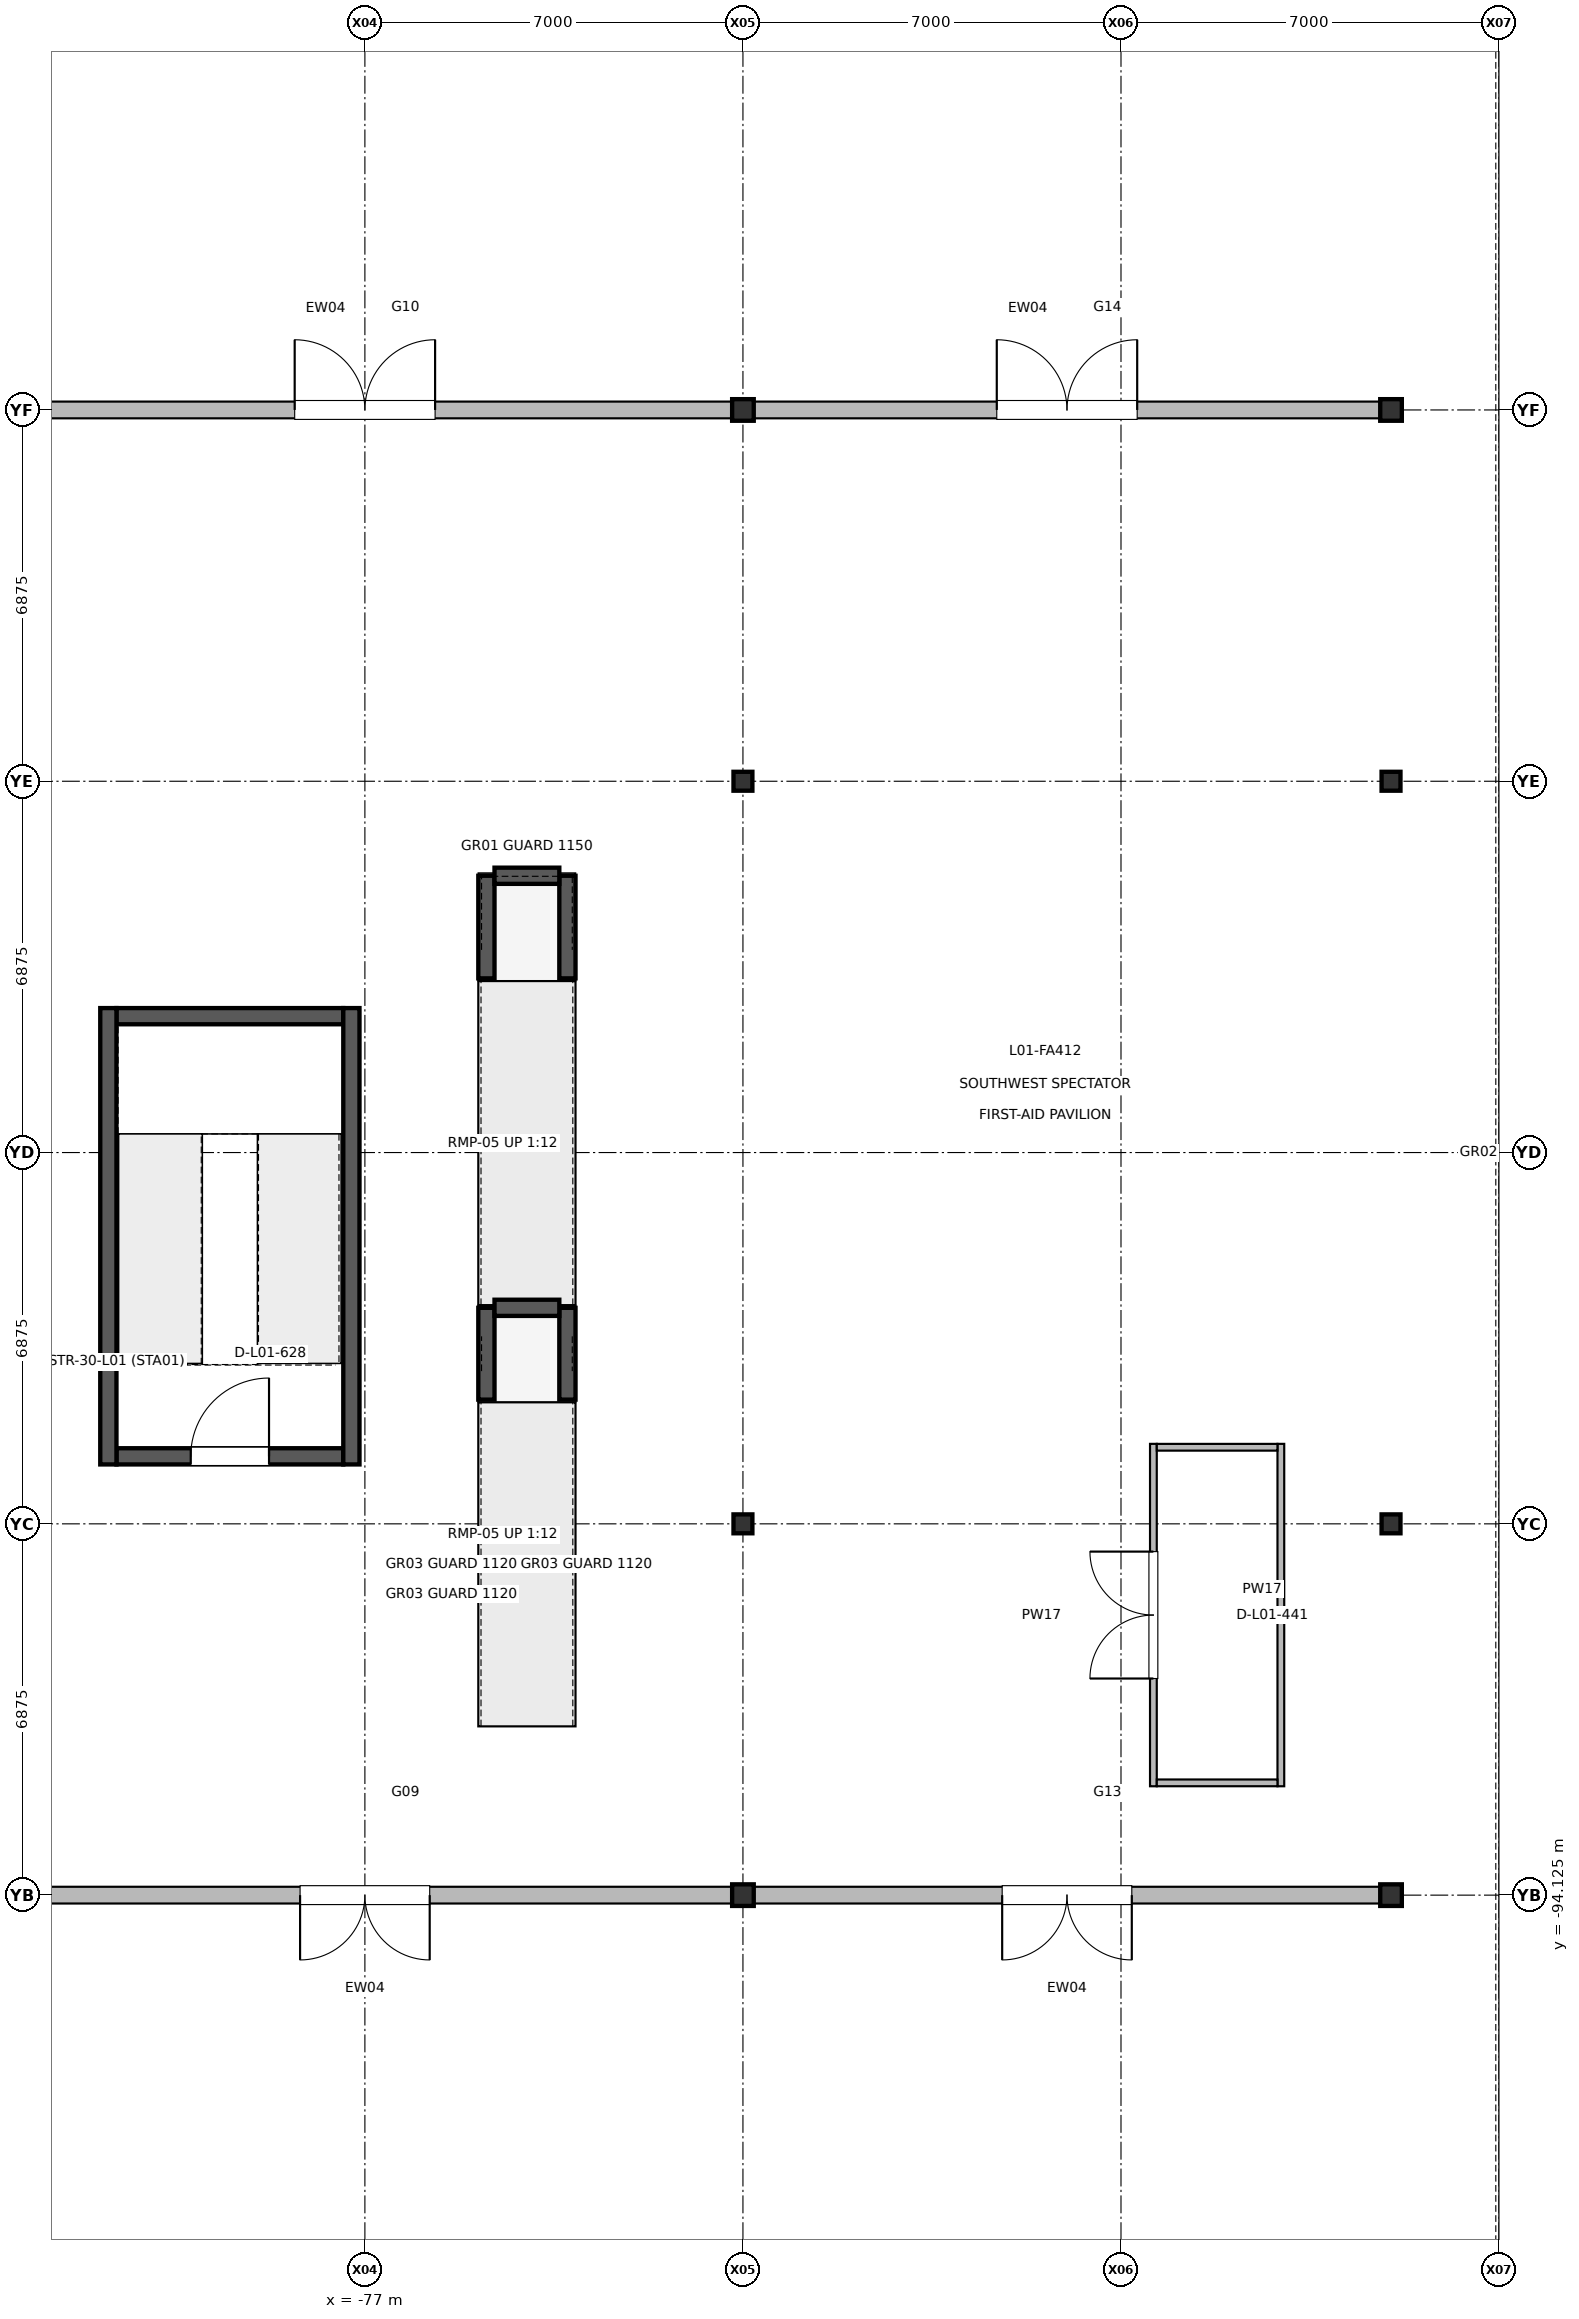
"""IFC4 building model, lengths in metres.
Left out: names, types, materials, properties, quantities, classifications, styles, units other than length and angle.
Written with IfcOpenShell. Run it as: python <this file> out.ifc"""

import sys

from ifc_helpers import new_model, si_unit, direction, frame, frame_2d, origin, origin_2d, place, context, subcontext, project, spatial, rectangle, i_section, extrude, element, fill, save


model = new_model("IFC4")
c1 = context("Model", 3, precision=1e-05, world=origin(), true_north=direction((0.0, 1.0)))
c2 = subcontext(c1, "Body", "Model", "MODEL_VIEW")
j1 = project(units=[si_unit("LENGTHUNIT", "METRE"), si_unit("PLANEANGLEUNIT", "RADIAN")], contexts=[c1])
p1 = place(None, origin())
s1 = spatial("IfcSite", under=j1, at=p1, CompositionType="ELEMENT")
p2 = place(p1, origin())
s2 = spatial("IfcBuilding", under=s1, at=p2, CompositionType="ELEMENT")
p3 = place(p2, origin())
s3 = spatial("IfcBuildingStorey", under=s2, at=p3, CompositionType="ELEMENT", Elevation=0.0)
p4 = place(p3, frame((-70.0, -94.125, 0.0), z_axis=(0.0, 0.0, 1.0), x_axis=(1.0, 0.0, 0.0)))
e1 = element("IfcColumn", 1, at=p4, inside=s3, PredefinedType="COLUMN", context=c2, shape_type="SweptSolid", body=[
    extrude(i_section(OverallWidth=0.4, OverallDepth=0.4, WebThickness=0.013, FlangeThickness=0.021, at=origin_2d()), origin(), (0.0, 0.0, 1.0), 5.998),
])
for number, where, z_axis, x_axis in (
    (2, (-70.0, -87.25, 0.0), (0.0, 0.0, 1.0), (1.0, 0.0, 0.0)),
    (3, (-70.0, -73.5, 0.0), (0.0, 0.0, 1.0), (1.0, 0.0, 0.0)),
):
    element("IfcColumn", number, at=place(p3, frame(where, z_axis=z_axis, x_axis=x_axis)), inside=s3, PredefinedType="COLUMN", context=c2, shape_type="SweptSolid", body=[
        extrude(i_section(OverallWidth=0.35, OverallDepth=0.35, WebThickness=0.012, FlangeThickness=0.019, at=origin_2d()), origin(), (0.0, 0.0, 1.0), 5.998),
    ])
for number, where, z_axis, x_axis in (
    (4, (-70.0, -66.625, 0.0), (0.0, 0.0, 1.0), (1.0, 0.0, 0.0)),
    (5, (-58.0, -94.125, 0.0), (0.0, 0.0, 1.0), (1.0, 0.0, 0.0)),
):
    element("IfcColumn", number, at=place(p3, frame(where, z_axis=z_axis, x_axis=x_axis)), inside=s3, PredefinedType="COLUMN", context=c2, shape_type="SweptSolid", body=[
        extrude(i_section(OverallWidth=0.4, OverallDepth=0.4, WebThickness=0.013, FlangeThickness=0.021, at=origin_2d()), origin(), (0.0, 0.0, 1.0), 5.998),
    ])
for number, where, z_axis, x_axis in (
    (6, (-58.0, -87.25, 0.0), (0.0, 0.0, 1.0), (1.0, 0.0, 0.0)),
    (7, (-58.0, -73.5, 0.0), (0.0, 0.0, 1.0), (1.0, 0.0, 0.0)),
):
    element("IfcColumn", number, at=place(p3, frame(where, z_axis=z_axis, x_axis=x_axis)), inside=s3, PredefinedType="COLUMN", context=c2, shape_type="SweptSolid", body=[
        extrude(i_section(OverallWidth=0.35, OverallDepth=0.35, WebThickness=0.012, FlangeThickness=0.019, at=origin_2d()), origin(), (0.0, 0.0, 1.0), 5.998),
    ])
p5 = place(p3, frame((-58.0, -66.625, 0.0), z_axis=(0.0, 0.0, 1.0), x_axis=(1.0, 0.0, 0.0)))
e8 = element("IfcColumn", 8, at=p5, inside=s3, PredefinedType="COLUMN", context=c2, shape_type="SweptSolid", body=[
    extrude(i_section(OverallWidth=0.4, OverallDepth=0.4, WebThickness=0.013, FlangeThickness=0.021, at=origin_2d()), origin(), (0.0, 0.0, 1.0), 5.998),
])
p6 = place(p3, frame((-70.19, -94.125, 0.0), z_axis=(0.0, 0.0, 1.0), x_axis=(-1.0, 0.0, 0.0)))
e9 = element("IfcWall", 9, at=p6, inside=s3, PredefinedType="SOLIDWALL", context=c2, shape_type="SweptSolid", body=[
    extrude(rectangle(XDim=13.62, YDim=0.31, at=frame_2d((6.81, 0.0))), origin(), (0.0, 0.0, 1.0), 3.975),
])
p7 = place(p6, frame((5.61, 0.0, 0.0)))
e10 = element("IfcOpeningElement", 10, at=p7, cuts=e9, PredefinedType="OPENING", context=c2, shape_type="SweptSolid", body=[
    extrude(rectangle(XDim=2.4, YDim=2.5, at=frame_2d((1.2, 1.25))), frame((0.0, 0.165, 0.0), z_axis=(0.0, -1.0, 0.0), x_axis=(1.0, 0.0, 0.0)), (0.0, 0.0, 1.0), 0.33),
])
p8 = place(p3, frame((-83.81, -66.625, 0.0), z_axis=(0.0, 0.0, 1.0), x_axis=(1.0, 0.0, 0.0)))
e11 = element("IfcWall", 11, at=p8, inside=s3, PredefinedType="SOLIDWALL", context=c2, shape_type="SweptSolid", body=[
    extrude(rectangle(XDim=13.62, YDim=0.31, at=frame_2d((6.81, 0.0))), origin(), (0.0, 0.0, 1.0), 4.175),
])
p9 = place(p8, frame((5.51, 0.0, 0.0)))
e12 = element("IfcOpeningElement", 12, at=p9, cuts=e11, PredefinedType="OPENING", context=c2, shape_type="SweptSolid", body=[
    extrude(rectangle(XDim=2.6, YDim=2.55, at=frame_2d((1.3, 1.275))), frame((0.0, 0.165, 0.0), z_axis=(0.0, -1.0, 0.0), x_axis=(1.0, 0.0, 0.0)), (0.0, 0.0, 1.0), 0.33),
])
p10 = place(p3, frame((-58.19, -94.125, 0.0), z_axis=(0.0, 0.0, 1.0), x_axis=(-1.0, 0.0, 0.0)))
e13 = element("IfcWall", 13, at=p10, inside=s3, PredefinedType="SOLIDWALL", context=c2, shape_type="SweptSolid", body=[
    extrude(rectangle(XDim=11.62, YDim=0.31, at=frame_2d((5.81, 0.0))), origin(), (0.0, 0.0, 1.0), 3.975),
])
p11 = place(p10, frame((4.61, 0.0, 0.0)))
e14 = element("IfcOpeningElement", 14, at=p11, cuts=e13, PredefinedType="OPENING", context=c2, shape_type="SweptSolid", body=[
    extrude(rectangle(XDim=2.4, YDim=2.5, at=frame_2d((1.2, 1.25))), frame((0.0, 0.165, 0.0), z_axis=(0.0, -1.0, 0.0), x_axis=(1.0, 0.0, 0.0)), (0.0, 0.0, 1.0), 0.33),
])
p12 = place(p3, frame((-69.81, -66.625, 0.0), z_axis=(0.0, 0.0, 1.0), x_axis=(1.0, 0.0, 0.0)))
e15 = element("IfcWall", 15, at=p12, inside=s3, PredefinedType="SOLIDWALL", context=c2, shape_type="SweptSolid", body=[
    extrude(rectangle(XDim=11.62, YDim=0.31, at=frame_2d((5.81, 0.0))), origin(), (0.0, 0.0, 1.0), 4.175),
])
p13 = place(p12, frame((4.51, 0.0, 0.0)))
e16 = element("IfcOpeningElement", 16, at=p13, cuts=e15, PredefinedType="OPENING", context=c2, shape_type="SweptSolid", body=[
    extrude(rectangle(XDim=2.6, YDim=2.55, at=frame_2d((1.3, 1.275))), frame((0.0, 0.165, 0.0), z_axis=(0.0, -1.0, 0.0), x_axis=(1.0, 0.0, 0.0)), (0.0, 0.0, 1.0), 0.33),
])
p14 = place(p3, frame((-62.4, -92.109, 0.0), z_axis=(0.0, 0.0, 1.0), x_axis=(0.0, 1.0, 0.0)))
e17 = element("IfcWall", 17, at=p14, inside=s3, PredefinedType="PARTITIONING", context=c2, shape_type="SweptSolid", body=[
    extrude(rectangle(XDim=6.34, YDim=0.125, at=frame_2d((3.17, 0.0))), origin(), (0.0, 0.0, 1.0), 4.775),
])
p15 = place(p14, frame((1.995, 0.0, 0.0)))
e18 = element("IfcOpeningElement", 18, at=p15, cuts=e17, PredefinedType="OPENING", context=c2, shape_type="SweptSolid", body=[
    extrude(rectangle(XDim=2.35, YDim=2.5, at=frame_2d((1.175, 1.25))), frame((0.0, 0.073, 0.0), z_axis=(0.0, -1.0, 0.0), x_axis=(1.0, 0.0, 0.0)), (0.0, 0.0, 1.0), 0.145),
])
p16 = place(p3, frame((-60.04, -92.109, 0.0), z_axis=(0.0, 0.0, 1.0), x_axis=(0.0, 1.0, 0.0)))
e19 = element("IfcWall", 19, at=p16, inside=s3, PredefinedType="PARTITIONING", context=c2, shape_type="SweptSolid", body=[
    extrude(rectangle(XDim=6.34, YDim=0.125, at=frame_2d((3.17, 0.0))), origin(), (0.0, 0.0, 1.0), 4.775),
])
for number, where, z_axis, x_axis in (
    (20, (-62.337, -92.046, 0.0), (0.0, 0.0, 1.0), (1.0, 0.0, 0.0)),
    (21, (-62.337, -85.832, 0.0), (0.0, 0.0, 1.0), (1.0, 0.0, 0.0)),
):
    element("IfcWall", number, at=place(p3, frame(where, z_axis=z_axis, x_axis=x_axis)), inside=s3, PredefinedType="PARTITIONING", context=c2, shape_type="SweptSolid", body=[
        extrude(rectangle(XDim=2.234, YDim=0.125, at=frame_2d((1.117, 0.0))), origin(), (0.0, 0.0, 1.0), 5.02),
    ])
p17 = place(p3, frame((-81.6, -86.0, 0.0), z_axis=(0.0, 0.0, 1.0), x_axis=(1.0, 0.0, 0.0)))
e22 = element("IfcWall", 22, at=p17, inside=s3, PredefinedType="SHEAR", context=c2, shape_type="SweptSolid", body=[
    extrude(rectangle(XDim=4.2, YDim=0.3, at=frame_2d((2.1, 0.0))), origin(), (0.0, 0.0, 1.0), 5.8),
])
p18 = place(p17, frame((1.375, 0.0, 0.0)))
e23 = element("IfcOpeningElement", 23, at=p18, cuts=e22, PredefinedType="OPENING", context=c2, shape_type="SweptSolid", body=[
    extrude(rectangle(XDim=1.45, YDim=2.2, at=frame_2d((0.725, 1.1))), frame((0.0, 0.16, 0.0), z_axis=(0.0, -1.0, 0.0), x_axis=(1.0, 0.0, 0.0)), (0.0, 0.0, 1.0), 0.32),
])
p19 = place(p3, frame((-81.6, -77.85, 0.0), z_axis=(0.0, 0.0, 1.0), x_axis=(1.0, 0.0, 0.0)))
e24 = element("IfcWall", 24, at=p19, inside=s3, PredefinedType="SHEAR", context=c2, shape_type="SweptSolid", body=[
    extrude(rectangle(XDim=4.2, YDim=0.3, at=frame_2d((2.1, 0.0))), origin(), (0.0, 0.0, 1.0), 5.8),
])
for number, where, z_axis, x_axis in (
    (25, (-81.75, -86.15, 0.0), (0.0, 0.0, 1.0), (0.0, 1.0, 0.0)),
    (26, (-77.25, -86.15, 0.0), (0.0, 0.0, 1.0), (0.0, 1.0, 0.0)),
):
    element("IfcWall", number, at=place(p3, frame(where, z_axis=z_axis, x_axis=x_axis)), inside=s3, PredefinedType="SHEAR", context=c2, shape_type="SweptSolid", body=[
        extrude(rectangle(XDim=8.45, YDim=0.3, at=frame_2d((4.225, 0.0))), origin(), (0.0, 0.0, 1.0), 5.8),
    ])
for number, where, z_axis, x_axis in (
    (27, (-74.75, -84.95, 0.0), (0.0, 0.0, 1.0), (0.0, 1.0, 0.0)),
    (28, (-73.25, -84.95, 0.0), (0.0, 0.0, 1.0), (0.0, 1.0, 0.0)),
):
    element("IfcWall", number, at=place(p3, frame(where, z_axis=z_axis, x_axis=x_axis)), inside=s3, PredefinedType="SHEAR", context=c2, shape_type="SweptSolid", body=[
        extrude(rectangle(XDim=1.7, YDim=0.3, at=frame_2d((0.85, 0.0))), origin(), (0.0, 0.0, 1.0), 0.3),
    ])
p20 = place(p3, frame((-74.6, -83.25, 0.0), z_axis=(0.0, 0.0, 1.0), x_axis=(1.0, 0.0, 0.0)))
e29 = element("IfcWall", 29, at=p20, inside=s3, PredefinedType="SHEAR", context=c2, shape_type="SweptSolid", body=[
    extrude(rectangle(XDim=1.2, YDim=0.3, at=frame_2d((0.6, 0.0))), origin(), (0.0, 0.0, 1.0), 0.3),
])
for number, where, z_axis, x_axis in (
    (30, (-74.75, -77.15, 0.0), (0.0, 0.0, 1.0), (0.0, 1.0, 0.0)),
    (31, (-73.25, -77.15, 0.0), (0.0, 0.0, 1.0), (0.0, 1.0, 0.0)),
):
    element("IfcWall", number, at=place(p3, frame(where, z_axis=z_axis, x_axis=x_axis)), inside=s3, PredefinedType="SHEAR", context=c2, shape_type="SweptSolid", body=[
        extrude(rectangle(XDim=1.9, YDim=0.3, at=frame_2d((0.95, 0.0))), origin(), (0.0, 0.0, 1.0), 0.8),
    ])
p21 = place(p3, frame((-74.6, -75.25, 0.0), z_axis=(0.0, 0.0, 1.0), x_axis=(1.0, 0.0, 0.0)))
e32 = element("IfcWall", 32, at=p21, inside=s3, PredefinedType="SHEAR", context=c2, shape_type="SweptSolid", body=[
    extrude(rectangle(XDim=1.2, YDim=0.3, at=frame_2d((0.6, 0.0))), origin(), (0.0, 0.0, 1.0), 0.8),
])
p22 = place(p7, origin())
e33 = element("IfcDoor", 33, at=p22, inside=s3, OperationType="DOUBLE_DOOR_SINGLE_SWING", PredefinedType="DOOR", context=c2, shape_type="SweptSolid", body=[
    extrude(rectangle(XDim=2.4, YDim=2.5, at=frame_2d((1.2, 1.25))), frame((0.0, 0.025, 0.0), z_axis=(0.0, -1.0, 0.0), x_axis=(1.0, 0.0, 0.0)), (0.0, 0.0, 1.0), 0.05),
])
fill(e10, e33)
p23 = place(p9, origin())
e34 = element("IfcDoor", 34, at=p23, inside=s3, OperationType="DOUBLE_DOOR_SINGLE_SWING", PredefinedType="DOOR", context=c2, shape_type="SweptSolid", body=[
    extrude(rectangle(XDim=2.6, YDim=2.55, at=frame_2d((1.3, 1.275))), frame((0.0, 0.025, 0.0), z_axis=(0.0, -1.0, 0.0), x_axis=(1.0, 0.0, 0.0)), (0.0, 0.0, 1.0), 0.05),
])
fill(e12, e34)
p24 = place(p11, origin())
e35 = element("IfcDoor", 35, at=p24, inside=s3, OperationType="DOUBLE_DOOR_SINGLE_SWING", PredefinedType="DOOR", context=c2, shape_type="SweptSolid", body=[
    extrude(rectangle(XDim=2.4, YDim=2.5, at=frame_2d((1.2, 1.25))), frame((0.0, 0.025, 0.0), z_axis=(0.0, -1.0, 0.0), x_axis=(1.0, 0.0, 0.0)), (0.0, 0.0, 1.0), 0.05),
])
fill(e14, e35)
p25 = place(p13, origin())
e36 = element("IfcDoor", 36, at=p25, inside=s3, OperationType="DOUBLE_DOOR_SINGLE_SWING", PredefinedType="DOOR", context=c2, shape_type="SweptSolid", body=[
    extrude(rectangle(XDim=2.6, YDim=2.55, at=frame_2d((1.3, 1.275))), frame((0.0, 0.025, 0.0), z_axis=(0.0, -1.0, 0.0), x_axis=(1.0, 0.0, 0.0)), (0.0, 0.0, 1.0), 0.05),
])
fill(e16, e36)
p26 = place(p15, origin())
e37 = element("IfcDoor", 37, at=p26, inside=s3, OperationType="DOUBLE_DOOR_SINGLE_SWING", PredefinedType="DOOR", context=c2, shape_type="SweptSolid", body=[
    extrude(rectangle(XDim=2.35, YDim=2.5, at=frame_2d((1.175, 1.25))), frame((0.0, 0.025, 0.0), z_axis=(0.0, -1.0, 0.0), x_axis=(1.0, 0.0, 0.0)), (0.0, 0.0, 1.0), 0.05),
])
fill(e18, e37)
p27 = place(p18, origin())
e38 = element("IfcDoor", 38, at=p27, inside=s3, OperationType="SINGLE_SWING_RIGHT", PredefinedType="DOOR", context=c2, shape_type="SweptSolid", body=[
    extrude(rectangle(XDim=1.45, YDim=2.2, at=frame_2d((0.725, 1.1))), frame((0.0, 0.025, 0.0), z_axis=(0.0, -1.0, 0.0), x_axis=(1.0, 0.0, 0.0)), (0.0, 0.0, 1.0), 0.05),
])
fill(e23, e38)
save(model, sys.argv[1])
